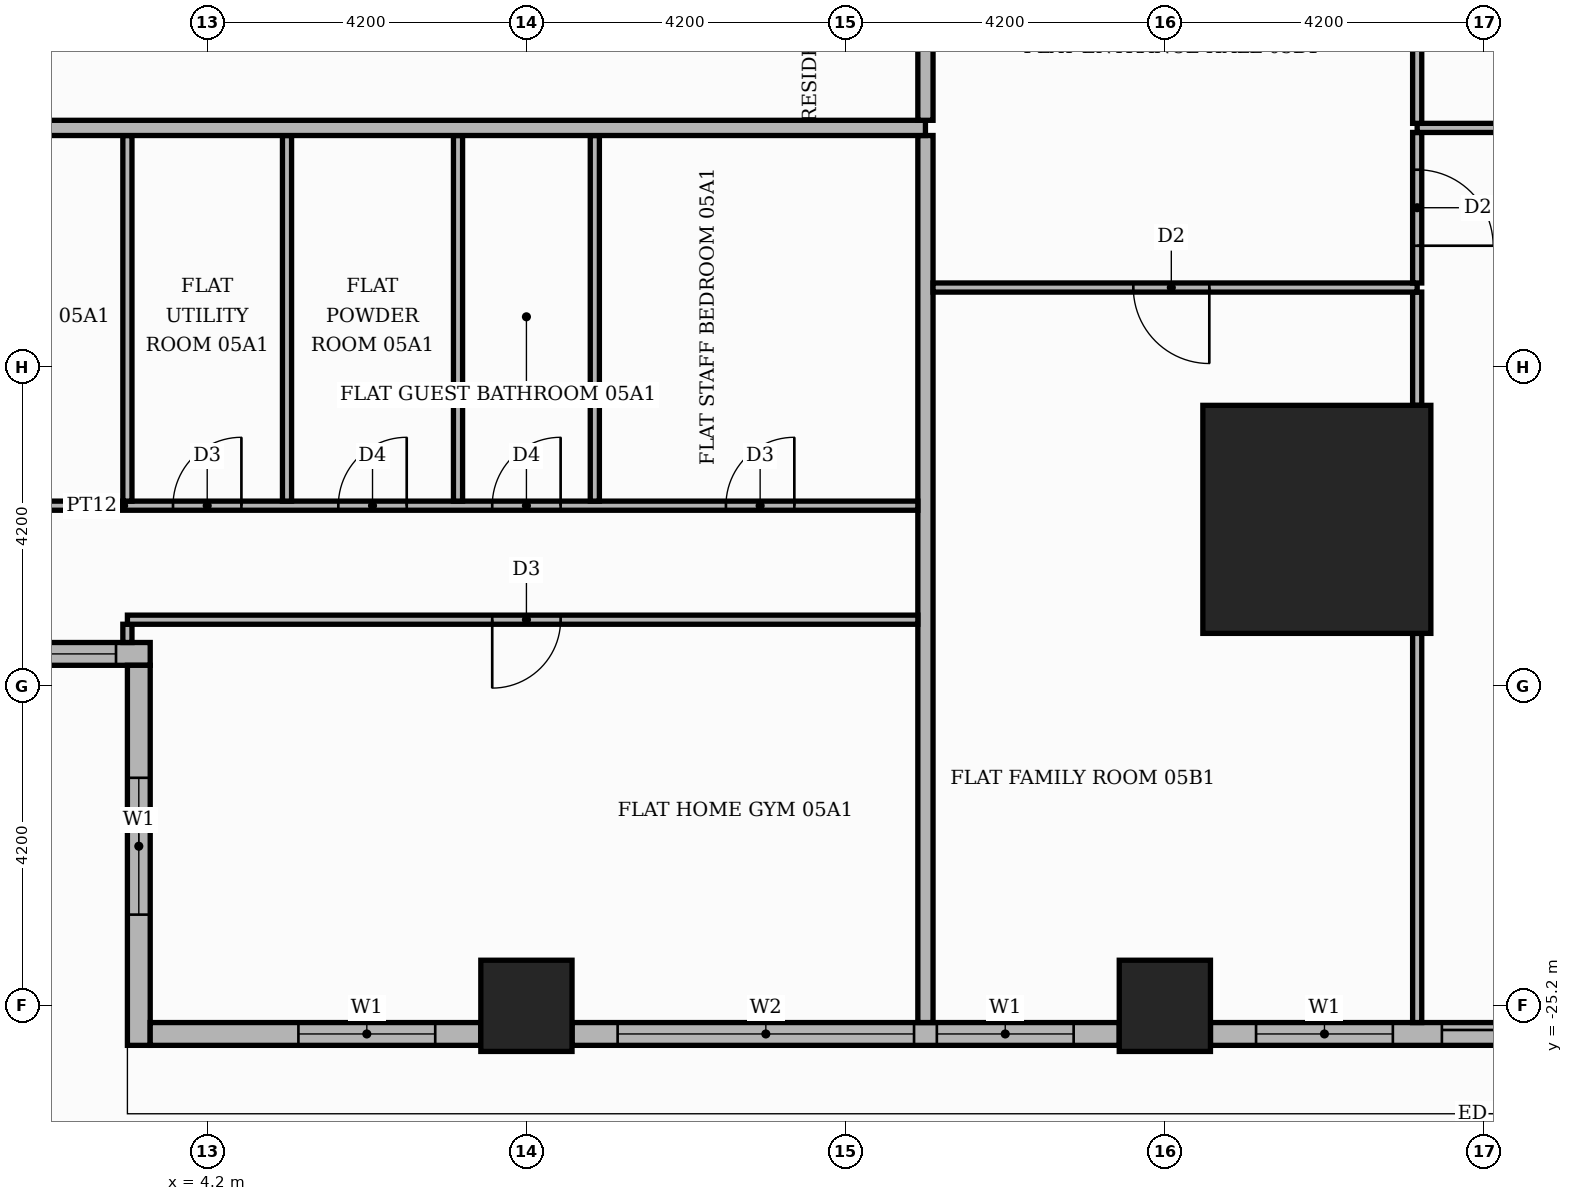
"""IFC4 building model, lengths in metres.
Left out: names, types, materials, properties, quantities, classifications, styles, units other than length and angle.
Written with IfcOpenShell. Run it as: python <this file> out.ifc"""

import sys

from ifc_helpers import new_model, si_unit, direction, frame, frame_2d, origin, origin_2d, place, context, subcontext, project, spatial, rectangle, extrude, element, fill, save


model = new_model("IFC4")
c1 = context("Model", 3, precision=1e-05, world=origin(), true_north=direction((0.0, 1.0)))
c2 = subcontext(c1, "Body", "Model", "MODEL_VIEW")
j1 = project(units=[si_unit("LENGTHUNIT", "METRE"), si_unit("PLANEANGLEUNIT", "RADIAN")], contexts=[c1])
p1 = place(None, origin())
s1 = spatial("IfcSite", under=j1, at=p1, CompositionType="ELEMENT")
p2 = place(p1, origin())
s2 = spatial("IfcBuilding", under=s1, at=p2, CompositionType="ELEMENT")
p3 = place(p2, frame((0.0, 0.0, 27.0)))
s3 = spatial("IfcBuildingStorey", under=s2, at=p3, CompositionType="ELEMENT", Elevation=27.0)
p4 = place(p3, frame((18.8, -18.8, 0.0), z_axis=(0.0, 0.0, 1.0), x_axis=(1.0, 0.0, 0.0)))
e1 = element("IfcColumn", 1, at=p4, inside=s3, PredefinedType="COLUMN", context=c2, shape_type="SweptSolid", body=[
    extrude(rectangle(XDim=3.0, YDim=3.0, at=origin_2d()), origin(), (0.0, 0.0, 1.0), 3.9),
])
for number, where, z_axis, x_axis in (
    (2, (8.4, -25.2, 0.0), (0.0, 0.0, 1.0), (1.0, 0.0, 0.0)),
    (3, (16.8, -25.2, 0.0), (0.0, 0.0, 1.0), (1.0, 0.0, 0.0)),
):
    element("IfcColumn", number, at=place(p3, frame(where, z_axis=z_axis, x_axis=x_axis)), inside=s3, PredefinedType="COLUMN", context=c2, shape_type="SweptSolid", body=[
        extrude(rectangle(XDim=1.2, YDim=1.2, at=origin_2d()), origin(), (0.0, 0.0, 1.0), 3.9),
    ])
p5 = place(p3, frame((-3.15, -20.57, 0.0), z_axis=(0.0, 0.0, 1.0), x_axis=(1.0, 0.0, 0.0)))
e4 = element("IfcWall", 4, at=p5, inside=s3, PredefinedType="STANDARD", context=c2, shape_type="SweptSolid", body=[
    extrude(rectangle(XDim=6.6, YDim=0.3, at=frame_2d((3.3, 0.0))), origin(), (0.0, 0.0, 1.0), 3.48),
])
p6 = place(p5, frame((0.15, 0.0, 0.9)))
e5 = element("IfcOpeningElement", 5, at=p6, cuts=e4, PredefinedType="OPENING", context=c2, shape_type="SweptSolid", body=[
    extrude(rectangle(XDim=6.0, YDim=2.1, at=frame_2d((3.0, 1.05))), frame((0.0, 0.16, 0.0), z_axis=(0.0, -1.0, 0.0), x_axis=(1.0, 0.0, 0.0)), (0.0, 0.0, 1.0), 0.32),
])
p7 = place(p3, frame((3.3, -20.72, 0.0), z_axis=(0.0, 0.0, 1.0), x_axis=(0.0, -1.0, 0.0)))
e6 = element("IfcWall", 6, at=p7, inside=s3, PredefinedType="STANDARD", context=c2, shape_type="SweptSolid", body=[
    extrude(rectangle(XDim=5.0, YDim=0.3, at=frame_2d((2.5, 0.0))), origin(), (0.0, 0.0, 1.0), 3.48),
])
p8 = place(p7, frame((1.48, 0.0, 0.9)))
e7 = element("IfcOpeningElement", 7, at=p8, cuts=e6, PredefinedType="OPENING", context=c2, shape_type="SweptSolid", body=[
    extrude(rectangle(XDim=1.8, YDim=2.1, at=frame_2d((0.9, 1.05))), frame((0.0, 0.16, 0.0), z_axis=(0.0, -1.0, 0.0), x_axis=(1.0, 0.0, 0.0)), (0.0, 0.0, 1.0), 0.32),
])
p9 = place(p3, frame((3.45, -25.57, 0.0), z_axis=(0.0, 0.0, 1.0), x_axis=(1.0, 0.0, 0.0)))
e8 = element("IfcWall", 8, at=p9, inside=s3, PredefinedType="STANDARD", context=c2, shape_type="SweptSolid", body=[
    extrude(rectangle(XDim=4.35, YDim=0.3, at=frame_2d((2.175, 0.0))), origin(), (0.0, 0.0, 1.0), 3.48),
])
p10 = place(p9, frame((1.95, 0.0, 0.9)))
e9 = element("IfcOpeningElement", 9, at=p10, cuts=e8, PredefinedType="OPENING", context=c2, shape_type="SweptSolid", body=[
    extrude(rectangle(XDim=1.8, YDim=2.1, at=frame_2d((0.9, 1.05))), frame((0.0, 0.16, 0.0), z_axis=(0.0, -1.0, 0.0), x_axis=(1.0, 0.0, 0.0)), (0.0, 0.0, 1.0), 0.32),
])
p11 = place(p3, frame((9.0, -25.57, 0.0), z_axis=(0.0, 0.0, 1.0), x_axis=(1.0, 0.0, 0.0)))
e10 = element("IfcWall", 10, at=p11, inside=s3, PredefinedType="STANDARD", context=c2, shape_type="SweptSolid", body=[
    extrude(rectangle(XDim=7.2, YDim=0.3, at=frame_2d((3.6, 0.0))), origin(), (0.0, 0.0, 1.0), 3.48),
])
p12 = place(p11, frame((0.6, 0.0, 0.9)))
e11 = element("IfcOpeningElement", 11, at=p12, cuts=e10, PredefinedType="OPENING", context=c2, shape_type="SweptSolid", body=[
    extrude(rectangle(XDim=3.9, YDim=2.1, at=frame_2d((1.95, 1.05))), frame((0.0, 0.16, 0.0), z_axis=(0.0, -1.0, 0.0), x_axis=(1.0, 0.0, 0.0)), (0.0, 0.0, 1.0), 0.32),
])
p13 = place(p11, frame((4.8, 0.0, 0.9)))
e12 = element("IfcOpeningElement", 12, at=p13, cuts=e10, PredefinedType="OPENING", context=c2, shape_type="SweptSolid", body=[
    extrude(rectangle(XDim=1.8, YDim=2.1, at=frame_2d((0.9, 1.05))), frame((0.0, 0.16, 0.0), z_axis=(0.0, -1.0, 0.0), x_axis=(1.0, 0.0, 0.0)), (0.0, 0.0, 1.0), 0.32),
])
p14 = place(p3, frame((17.4, -25.57, 0.0), z_axis=(0.0, 0.0, 1.0), x_axis=(1.0, 0.0, 0.0)))
e13 = element("IfcWall", 13, at=p14, inside=s3, PredefinedType="STANDARD", context=c2, shape_type="SweptSolid", body=[
    extrude(rectangle(XDim=5.32, YDim=0.3, at=frame_2d((2.66, 0.0))), origin(), (0.0, 0.0, 1.0), 3.48),
])
p15 = place(p14, frame((0.6, 0.0, 0.9)))
e14 = element("IfcOpeningElement", 14, at=p15, cuts=e13, PredefinedType="OPENING", context=c2, shape_type="SweptSolid", body=[
    extrude(rectangle(XDim=1.8, YDim=2.1, at=frame_2d((0.9, 1.05))), frame((0.0, 0.16, 0.0), z_axis=(0.0, -1.0, 0.0), x_axis=(1.0, 0.0, 0.0)), (0.0, 0.0, 1.0), 0.32),
])
p16 = place(p14, frame((3.045, 0.0, 0.0)))
e15 = element("IfcOpeningElement", 15, at=p16, cuts=e13, PredefinedType="OPENING", context=c2, shape_type="SweptSolid", body=[
    extrude(rectangle(XDim=1.8, YDim=2.4, at=frame_2d((0.9, 1.2))), frame((0.0, 0.16, 0.0), z_axis=(0.0, -1.0, 0.0), x_axis=(1.0, 0.0, 0.0)), (0.0, 0.0, 1.0), 0.32),
])
p17 = place(p3, frame((13.65, -25.42, 0.0), z_axis=(0.0, 0.0, 1.0), x_axis=(0.0, 1.0, 0.0)))
e16 = element("IfcWall", 16, at=p17, inside=s3, PredefinedType="PARTITIONING", context=c2, shape_type="SweptSolid", body=[
    extrude(rectangle(XDim=11.67, YDim=0.2, at=frame_2d((5.835, 0.0))), origin(), (0.0, 0.0, 1.0), 3.48),
])
p18 = place(p3, frame((20.12, -25.42, 0.0), z_axis=(0.0, 0.0, 1.0), x_axis=(0.0, 1.0, 0.0)))
e17 = element("IfcWall", 17, at=p18, inside=s3, PredefinedType="PARTITIONING", context=c2, shape_type="SweptSolid", body=[
    extrude(rectangle(XDim=5.12, YDim=0.12, at=frame_2d((2.56, 0.0))), origin(), (0.0, 0.0, 1.0), 3.48),
])
p19 = place(p3, frame((3.15, -20.42, 0.0), z_axis=(0.0, 0.0, 1.0), x_axis=(0.0, 1.0, 0.0)))
e18 = element("IfcWall", 18, at=p19, inside=s3, PredefinedType="PARTITIONING", context=c2, shape_type="SweptSolid", body=[
    extrude(rectangle(XDim=0.24, YDim=0.12, at=frame_2d((0.12, 0.0))), origin(), (0.0, 0.0, 1.0), 3.48),
])
p20 = place(p3, frame((3.15, -20.12, 0.0), z_axis=(0.0, 0.0, 1.0), x_axis=(1.0, 0.0, 0.0)))
e19 = element("IfcWall", 19, at=p20, inside=s3, PredefinedType="PARTITIONING", context=c2, shape_type="SweptSolid", body=[
    extrude(rectangle(XDim=10.4, YDim=0.12, at=frame_2d((5.2, 0.0))), origin(), (0.0, 0.0, 1.0), 3.48),
])
p21 = place(p20, frame((4.8, 0.0, 0.0)))
e20 = element("IfcOpeningElement", 20, at=p21, cuts=e19, PredefinedType="OPENING", context=c2, shape_type="SweptSolid", body=[
    extrude(rectangle(XDim=0.9, YDim=2.1, at=frame_2d((0.45, 1.05))), frame((0.0, 0.07, 0.0), z_axis=(0.0, -1.0, 0.0), x_axis=(1.0, 0.0, 0.0)), (0.0, 0.0, 1.0), 0.14),
])
p22 = place(p3, frame((-7.35, -18.62, 0.0), z_axis=(0.0, 0.0, 1.0), x_axis=(1.0, 0.0, 0.0)))
e21 = element("IfcWall", 21, at=p22, inside=s3, PredefinedType="PARTITIONING", context=c2, shape_type="SweptSolid", body=[
    extrude(rectangle(XDim=20.9, YDim=0.12, at=frame_2d((10.45, 0.0))), origin(), (0.0, 0.0, 1.0), 3.48),
])
p23 = place(p22, frame((2.7, 0.0, 0.0)))
e22 = element("IfcOpeningElement", 22, at=p23, cuts=e21, PredefinedType="OPENING", context=c2, shape_type="SweptSolid", body=[
    extrude(rectangle(XDim=0.9, YDim=2.1, at=frame_2d((0.45, 1.05))), frame((0.0, 0.07, 0.0), z_axis=(0.0, -1.0, 0.0), x_axis=(1.0, 0.0, 0.0)), (0.0, 0.0, 1.0), 0.14),
])
p24 = place(p22, frame((7.95, 0.0, 0.0)))
e23 = element("IfcOpeningElement", 23, at=p24, cuts=e21, PredefinedType="OPENING", context=c2, shape_type="SweptSolid", body=[
    extrude(rectangle(XDim=0.9, YDim=2.1, at=frame_2d((0.45, 1.05))), frame((0.0, 0.07, 0.0), z_axis=(0.0, -1.0, 0.0), x_axis=(1.0, 0.0, 0.0)), (0.0, 0.0, 1.0), 0.14),
])
p25 = place(p22, frame((11.1, 0.0, 0.0)))
e24 = element("IfcOpeningElement", 24, at=p25, cuts=e21, PredefinedType="OPENING", context=c2, shape_type="SweptSolid", body=[
    extrude(rectangle(XDim=0.9, YDim=2.1, at=frame_2d((0.45, 1.05))), frame((0.0, 0.07, 0.0), z_axis=(0.0, -1.0, 0.0), x_axis=(1.0, 0.0, 0.0)), (0.0, 0.0, 1.0), 0.14),
])
p26 = place(p22, frame((13.275, 0.0, 0.0)))
e25 = element("IfcOpeningElement", 25, at=p26, cuts=e21, PredefinedType="OPENING", context=c2, shape_type="SweptSolid", body=[
    extrude(rectangle(XDim=0.9, YDim=2.1, at=frame_2d((0.45, 1.05))), frame((0.0, 0.07, 0.0), z_axis=(0.0, -1.0, 0.0), x_axis=(1.0, 0.0, 0.0)), (0.0, 0.0, 1.0), 0.14),
])
p27 = place(p22, frame((15.3, 0.0, 0.0)))
e26 = element("IfcOpeningElement", 26, at=p27, cuts=e21, PredefinedType="OPENING", context=c2, shape_type="SweptSolid", body=[
    extrude(rectangle(XDim=0.9, YDim=2.1, at=frame_2d((0.45, 1.05))), frame((0.0, 0.07, 0.0), z_axis=(0.0, -1.0, 0.0), x_axis=(1.0, 0.0, 0.0)), (0.0, 0.0, 1.0), 0.14),
])
p28 = place(p22, frame((18.375, 0.0, 0.0)))
e27 = element("IfcOpeningElement", 27, at=p28, cuts=e21, PredefinedType="OPENING", context=c2, shape_type="SweptSolid", body=[
    extrude(rectangle(XDim=0.9, YDim=2.1, at=frame_2d((0.45, 1.05))), frame((0.0, 0.07, 0.0), z_axis=(0.0, -1.0, 0.0), x_axis=(1.0, 0.0, 0.0)), (0.0, 0.0, 1.0), 0.14),
])
for number, where, z_axis, x_axis in (
    (28, (3.15, -18.56, 0.0), (0.0, 0.0, 1.0), (0.0, 1.0, 0.0)),
    (29, (5.25, -18.56, 0.0), (0.0, 0.0, 1.0), (0.0, 1.0, 0.0)),
    (30, (7.5, -18.56, 0.0), (0.0, 0.0, 1.0), (0.0, 1.0, 0.0)),
    (31, (9.3, -18.56, 0.0), (0.0, 0.0, 1.0), (0.0, 1.0, 0.0)),
):
    element("IfcWall", number, at=place(p3, frame(where, z_axis=z_axis, x_axis=x_axis)), inside=s3, PredefinedType="PARTITIONING", context=c2, shape_type="SweptSolid", body=[
        extrude(rectangle(XDim=4.81, YDim=0.12, at=frame_2d((2.405, 0.0))), origin(), (0.0, 0.0, 1.0), 3.48),
    ])
p29 = place(p3, frame((20.12, -17.3, 0.0), z_axis=(0.0, 0.0, 1.0), x_axis=(0.0, 1.0, 0.0)))
e32 = element("IfcWall", 32, at=p29, inside=s3, PredefinedType="PARTITIONING", context=c2, shape_type="SweptSolid", body=[
    extrude(rectangle(XDim=1.49, YDim=0.12, at=frame_2d((0.745, 0.0))), origin(), (0.0, 0.0, 1.0), 3.48),
])
p30 = place(p3, frame((13.75, -15.75, 0.0), z_axis=(0.0, 0.0, 1.0), x_axis=(1.0, 0.0, 0.0)))
e33 = element("IfcWall", 33, at=p30, inside=s3, PredefinedType="PARTITIONING", context=c2, shape_type="SweptSolid", body=[
    extrude(rectangle(XDim=6.37, YDim=0.12, at=frame_2d((3.185, 0.0))), origin(), (0.0, 0.0, 1.0), 3.48),
])
p31 = place(p30, frame((2.635, 0.0, 0.0)))
e34 = element("IfcOpeningElement", 34, at=p31, cuts=e33, PredefinedType="OPENING", context=c2, shape_type="SweptSolid", body=[
    extrude(rectangle(XDim=1.0, YDim=2.1, at=frame_2d((0.5, 1.05))), frame((0.0, 0.07, 0.0), z_axis=(0.0, -1.0, 0.0), x_axis=(1.0, 0.0, 0.0)), (0.0, 0.0, 1.0), 0.14),
])
p32 = place(p3, frame((20.12, -15.69, 0.0), z_axis=(0.0, 0.0, 1.0), x_axis=(0.0, 1.0, 0.0)))
e35 = element("IfcWall", 35, at=p32, inside=s3, PredefinedType="PARTITIONING", context=c2, shape_type="SweptSolid", body=[
    extrude(rectangle(XDim=1.98, YDim=0.12, at=frame_2d((0.99, 0.0))), origin(), (0.0, 0.0, 1.0), 3.48),
])
p33 = place(p32, frame((0.49, 0.0, 0.0)))
e36 = element("IfcOpeningElement", 36, at=p33, cuts=e35, PredefinedType="OPENING", context=c2, shape_type="SweptSolid", body=[
    extrude(rectangle(XDim=1.0, YDim=2.1, at=frame_2d((0.5, 1.05))), frame((0.0, 0.07, 0.0), z_axis=(0.0, -1.0, 0.0), x_axis=(1.0, 0.0, 0.0)), (0.0, 0.0, 1.0), 0.14),
])
p34 = place(p3, frame((-25.42, -13.65, 0.0), z_axis=(0.0, 0.0, 1.0), x_axis=(1.0, 0.0, 0.0)))
e37 = element("IfcWall", 37, at=p34, inside=s3, PredefinedType="PARTITIONING", context=c2, shape_type="SweptSolid", body=[
    extrude(rectangle(XDim=39.07, YDim=0.2, at=frame_2d((19.535, 0.0))), origin(), (0.0, 0.0, 1.0), 3.48),
])
p35 = place(p34, frame((14.37, 0.0, 0.0)))
e38 = element("IfcOpeningElement", 38, at=p35, cuts=e37, PredefinedType="OPENING", context=c2, shape_type="SweptSolid", body=[
    extrude(rectangle(XDim=1.1, YDim=2.4, at=frame_2d((0.55, 1.2))), frame((0.0, 0.11, 0.0), z_axis=(0.0, -1.0, 0.0), x_axis=(1.0, 0.0, 0.0)), (0.0, 0.0, 1.0), 0.22),
])
p36 = place(p3, frame((20.12, -13.65, 0.0), z_axis=(0.0, 0.0, 1.0), x_axis=(1.0, 0.0, 0.0)))
e39 = element("IfcWall", 39, at=p36, inside=s3, PredefinedType="PARTITIONING", context=c2, shape_type="SweptSolid", body=[
    extrude(rectangle(XDim=5.3, YDim=0.12, at=frame_2d((2.65, 0.0))), origin(), (0.0, 0.0, 1.0), 3.48),
])
p37 = place(p3, frame((20.12, -13.59, 0.0), z_axis=(0.0, 0.0, 1.0), x_axis=(0.0, 1.0, 0.0)))
e40 = element("IfcWall", 40, at=p37, inside=s3, PredefinedType="PARTITIONING", context=c2, shape_type="SweptSolid", body=[
    extrude(rectangle(XDim=4.08, YDim=0.12, at=frame_2d((2.04, 0.0))), origin(), (0.0, 0.0, 1.0), 3.48),
])
p38 = place(p37, frame((1.59, 0.0, 0.0)))
e41 = element("IfcOpeningElement", 41, at=p38, cuts=e40, PredefinedType="OPENING", context=c2, shape_type="SweptSolid", body=[
    extrude(rectangle(XDim=0.9, YDim=2.1, at=frame_2d((0.45, 1.05))), frame((0.0, 0.07, 0.0), z_axis=(0.0, -1.0, 0.0), x_axis=(1.0, 0.0, 0.0)), (0.0, 0.0, 1.0), 0.14),
])
p39 = place(p3, frame((13.65, -13.55, 0.0), z_axis=(0.0, 0.0, 1.0), x_axis=(0.0, 1.0, 0.0)))
e42 = element("IfcWall", 42, at=p39, inside=s3, PredefinedType="PARTITIONING", context=c2, shape_type="SweptSolid", body=[
    extrude(rectangle(XDim=8.2, YDim=0.2, at=frame_2d((4.1, 0.0))), origin(), (0.0, 0.0, 1.0), 3.48),
])
p40 = place(p39, frame((1.45, 0.0, 0.0)))
e43 = element("IfcOpeningElement", 43, at=p40, cuts=e42, PredefinedType="OPENING", context=c2, shape_type="SweptSolid", body=[
    extrude(rectangle(XDim=1.1, YDim=2.4, at=frame_2d((0.55, 1.2))), frame((0.0, 0.11, 0.0), z_axis=(0.0, -1.0, 0.0), x_axis=(1.0, 0.0, 0.0)), (0.0, 0.0, 1.0), 0.22),
])
p41 = place(p6, origin())
e44 = element("IfcWindow", 44, at=p41, inside=s3, PartitioningType="SINGLE_PANEL", PredefinedType="WINDOW", context=c2, shape_type="SweptSolid", body=[
    extrude(rectangle(XDim=6.0, YDim=2.1, at=frame_2d((3.0, 1.05))), frame((0.0, 0.03, 0.0), z_axis=(0.0, -1.0, 0.0), x_axis=(1.0, 0.0, 0.0)), (0.0, 0.0, 1.0), 0.06),
])
fill(e5, e44)
p42 = place(p8, origin())
e45 = element("IfcWindow", 45, at=p42, inside=s3, PartitioningType="SINGLE_PANEL", PredefinedType="WINDOW", context=c2, shape_type="SweptSolid", body=[
    extrude(rectangle(XDim=1.8, YDim=2.1, at=frame_2d((0.9, 1.05))), frame((0.0, 0.03, 0.0), z_axis=(0.0, -1.0, 0.0), x_axis=(1.0, 0.0, 0.0)), (0.0, 0.0, 1.0), 0.06),
])
fill(e7, e45)
p43 = place(p10, origin())
e46 = element("IfcWindow", 46, at=p43, inside=s3, PartitioningType="SINGLE_PANEL", PredefinedType="WINDOW", context=c2, shape_type="SweptSolid", body=[
    extrude(rectangle(XDim=1.8, YDim=2.1, at=frame_2d((0.9, 1.05))), frame((0.0, 0.03, 0.0), z_axis=(0.0, -1.0, 0.0), x_axis=(1.0, 0.0, 0.0)), (0.0, 0.0, 1.0), 0.06),
])
fill(e9, e46)
p44 = place(p12, origin())
e47 = element("IfcWindow", 47, at=p44, inside=s3, PartitioningType="SINGLE_PANEL", PredefinedType="WINDOW", context=c2, shape_type="SweptSolid", body=[
    extrude(rectangle(XDim=3.9, YDim=2.1, at=frame_2d((1.95, 1.05))), frame((0.0, 0.03, 0.0), z_axis=(0.0, -1.0, 0.0), x_axis=(1.0, 0.0, 0.0)), (0.0, 0.0, 1.0), 0.06),
])
fill(e11, e47)
p45 = place(p13, origin())
e48 = element("IfcWindow", 48, at=p45, inside=s3, PartitioningType="SINGLE_PANEL", PredefinedType="WINDOW", context=c2, shape_type="SweptSolid", body=[
    extrude(rectangle(XDim=1.8, YDim=2.1, at=frame_2d((0.9, 1.05))), frame((0.0, 0.03, 0.0), z_axis=(0.0, -1.0, 0.0), x_axis=(1.0, 0.0, 0.0)), (0.0, 0.0, 1.0), 0.06),
])
fill(e12, e48)
p46 = place(p15, origin())
e49 = element("IfcWindow", 49, at=p46, inside=s3, PartitioningType="SINGLE_PANEL", PredefinedType="WINDOW", context=c2, shape_type="SweptSolid", body=[
    extrude(rectangle(XDim=1.8, YDim=2.1, at=frame_2d((0.9, 1.05))), frame((0.0, 0.03, 0.0), z_axis=(0.0, -1.0, 0.0), x_axis=(1.0, 0.0, 0.0)), (0.0, 0.0, 1.0), 0.06),
])
fill(e14, e49)
p47 = place(p16, origin())
e50 = element("IfcDoor", 50, at=p47, inside=s3, OperationType="SLIDING_TO_RIGHT", PredefinedType="DOOR", context=c2, shape_type="SweptSolid", body=[
    extrude(rectangle(XDim=1.8, YDim=2.4, at=frame_2d((0.9, 1.2))), frame((0.0, 0.025, 0.0), z_axis=(0.0, -1.0, 0.0), x_axis=(1.0, 0.0, 0.0)), (0.0, 0.0, 1.0), 0.05),
])
fill(e15, e50)
p48 = place(p25, origin())
e51 = element("IfcDoor", 51, at=p48, inside=s3, OperationType="SINGLE_SWING_RIGHT", PredefinedType="DOOR", context=c2, shape_type="SweptSolid", body=[
    extrude(rectangle(XDim=0.9, YDim=2.1, at=frame_2d((0.45, 1.05))), frame((0.0, 0.025, 0.0), z_axis=(0.0, -1.0, 0.0), x_axis=(1.0, 0.0, 0.0)), (0.0, 0.0, 1.0), 0.05),
])
fill(e24, e51)
p49 = place(p26, origin())
e52 = element("IfcDoor", 52, at=p49, inside=s3, OperationType="SINGLE_SWING_RIGHT", PredefinedType="DOOR", context=c2, shape_type="SweptSolid", body=[
    extrude(rectangle(XDim=0.9, YDim=2.1, at=frame_2d((0.45, 1.05))), frame((0.0, 0.025, 0.0), z_axis=(0.0, -1.0, 0.0), x_axis=(1.0, 0.0, 0.0)), (0.0, 0.0, 1.0), 0.05),
])
fill(e25, e52)
p50 = place(p27, origin())
e53 = element("IfcDoor", 53, at=p50, inside=s3, OperationType="SINGLE_SWING_RIGHT", PredefinedType="DOOR", context=c2, shape_type="SweptSolid", body=[
    extrude(rectangle(XDim=0.9, YDim=2.1, at=frame_2d((0.45, 1.05))), frame((0.0, 0.025, 0.0), z_axis=(0.0, -1.0, 0.0), x_axis=(1.0, 0.0, 0.0)), (0.0, 0.0, 1.0), 0.05),
])
fill(e26, e53)
p51 = place(p28, origin())
e54 = element("IfcDoor", 54, at=p51, inside=s3, OperationType="SINGLE_SWING_RIGHT", PredefinedType="DOOR", context=c2, shape_type="SweptSolid", body=[
    extrude(rectangle(XDim=0.9, YDim=2.1, at=frame_2d((0.45, 1.05))), frame((0.0, 0.025, 0.0), z_axis=(0.0, -1.0, 0.0), x_axis=(1.0, 0.0, 0.0)), (0.0, 0.0, 1.0), 0.05),
])
fill(e27, e54)
p52 = place(p21, frame((0.9, 0.0, 0.0), z_axis=(0.0, 0.0, 1.0), x_axis=(-1.0, 0.0, 0.0)))
e55 = element("IfcDoor", 55, at=p52, inside=s3, OperationType="SINGLE_SWING_LEFT", PredefinedType="DOOR", context=c2, shape_type="SweptSolid", body=[
    extrude(rectangle(XDim=0.9, YDim=2.1, at=frame_2d((0.45, 1.05))), frame((0.0, 0.025, 0.0), z_axis=(0.0, -1.0, 0.0), x_axis=(1.0, 0.0, 0.0)), (0.0, 0.0, 1.0), 0.05),
])
fill(e20, e55)
p53 = place(p31, frame((1.0, 0.0, 0.0), z_axis=(0.0, 0.0, 1.0), x_axis=(-1.0, 0.0, 0.0)))
e56 = element("IfcDoor", 56, at=p53, inside=s3, OperationType="SINGLE_SWING_RIGHT", PredefinedType="DOOR", context=c2, shape_type="SweptSolid", body=[
    extrude(rectangle(XDim=1.0, YDim=2.1, at=frame_2d((0.5, 1.05))), frame((0.0, 0.025, 0.0), z_axis=(0.0, -1.0, 0.0), x_axis=(1.0, 0.0, 0.0)), (0.0, 0.0, 1.0), 0.05),
])
fill(e34, e56)
p54 = place(p33, frame((1.0, 0.0, 0.0), z_axis=(0.0, 0.0, 1.0), x_axis=(-1.0, 0.0, 0.0)))
e57 = element("IfcDoor", 57, at=p54, inside=s3, OperationType="SINGLE_SWING_LEFT", PredefinedType="DOOR", context=c2, shape_type="SweptSolid", body=[
    extrude(rectangle(XDim=1.0, YDim=2.1, at=frame_2d((0.5, 1.05))), frame((0.0, 0.025, 0.0), z_axis=(0.0, -1.0, 0.0), x_axis=(1.0, 0.0, 0.0)), (0.0, 0.0, 1.0), 0.05),
])
fill(e36, e57)
save(model, sys.argv[1])
